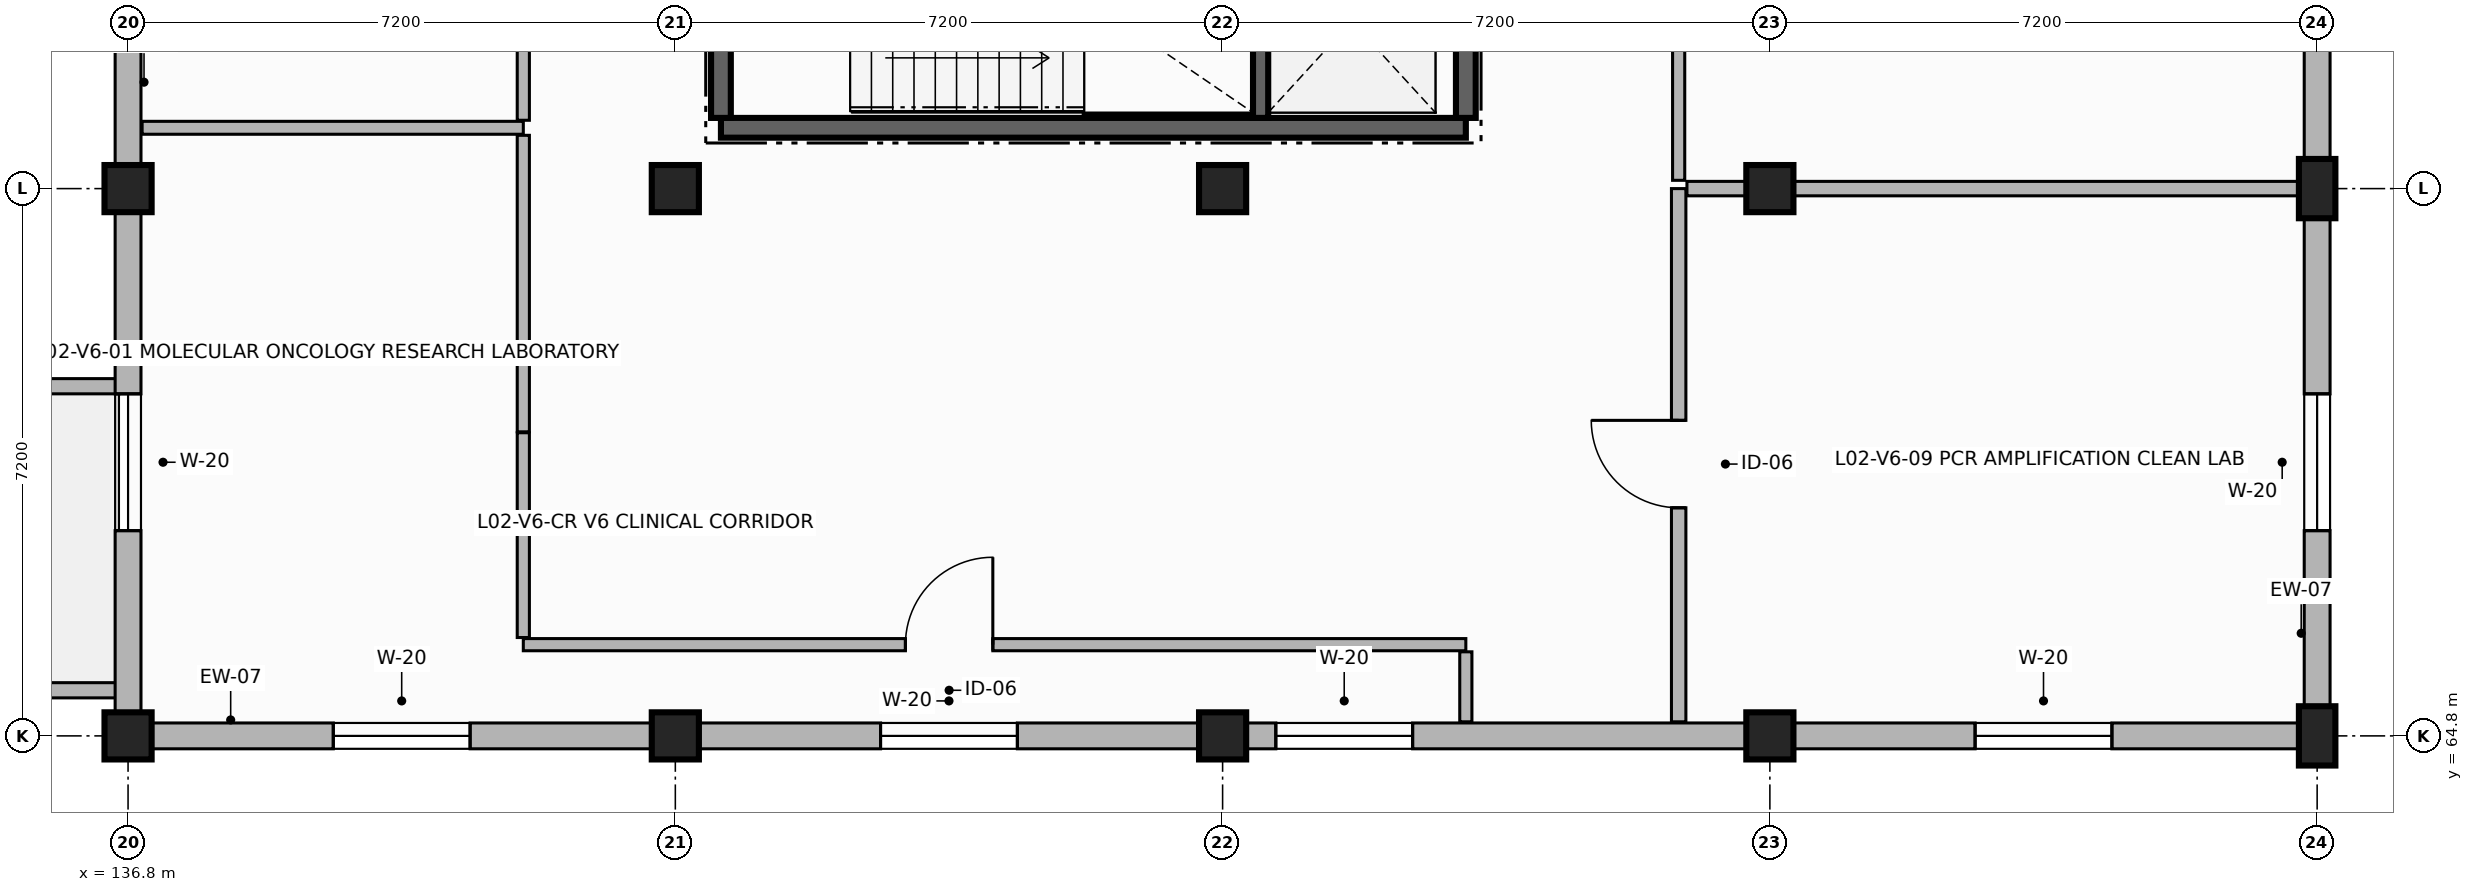
"""IFC4 building model, lengths in metres.
Left out: names, types, materials, properties, quantities, classifications, styles, units other than length and angle.
Written with IfcOpenShell. Run it as: python <this file> out.ifc"""

import sys

from ifc_helpers import new_model, si_unit, direction, frame, frame_2d, origin, origin_2d, place, context, subcontext, project, spatial, rectangle, extrude, element, fill, save


model = new_model("IFC4")
c1 = context("Model", 3, precision=1e-05, world=origin(), true_north=direction((0.0, 1.0)))
c2 = subcontext(c1, "Body", "Model", "MODEL_VIEW")
j1 = project(units=[si_unit("LENGTHUNIT", "METRE"), si_unit("PLANEANGLEUNIT", "RADIAN")], contexts=[c1])
p1 = place(None, origin())
s1 = spatial("IfcSite", under=j1, at=p1, CompositionType="ELEMENT")
p2 = place(p1, origin())
s2 = spatial("IfcBuilding", under=s1, at=p2, CompositionType="ELEMENT")
p3 = place(p2, frame((0.0, 0.0, 8.4)))
s3 = spatial("IfcBuildingStorey", under=s2, at=p3, CompositionType="ELEMENT", Elevation=8.4)
for number, where, z_axis, x_axis in (
    (1, (136.8, 64.8, 0.0), (0.0, 0.0, 1.0), (1.0, 0.0, 0.0)),
    (2, (136.8, 72.0, 0.0), (0.0, 0.0, 1.0), (1.0, 0.0, 0.0)),
    (3, (144.0, 64.8, 0.0), (0.0, 0.0, 1.0), (1.0, 0.0, 0.0)),
    (4, (144.0, 72.0, 0.0), (0.0, 0.0, 1.0), (1.0, 0.0, 0.0)),
    (5, (151.2, 64.8, 0.0), (0.0, 0.0, 1.0), (1.0, 0.0, 0.0)),
    (6, (151.2, 72.0, 0.0), (0.0, 0.0, 1.0), (1.0, 0.0, 0.0)),
    (7, (158.4, 64.8, 0.0), (0.0, 0.0, 1.0), (1.0, 0.0, 0.0)),
    (8, (158.4, 72.0, 0.0), (0.0, 0.0, 1.0), (1.0, 0.0, 0.0)),
):
    element("IfcColumn", number, at=place(p3, frame(where, z_axis=z_axis, x_axis=x_axis)), inside=s3, PredefinedType="COLUMN", context=c2, shape_type="SweptSolid", body=[
        extrude(rectangle(XDim=0.62, YDim=0.62, at=origin_2d()), origin(), (0.0, 0.0, 1.0), 3.58),
    ])
for number, where, z_axis, x_axis in (
    (9, (165.6, 64.8, 0.0), (0.0, 0.0, 1.0), (1.0, 0.0, 0.0)),
    (10, (165.6, 72.0, 0.0), (0.0, 0.0, 1.0), (1.0, 0.0, 0.0)),
):
    element("IfcColumn", number, at=place(p3, frame(where, z_axis=z_axis, x_axis=x_axis)), inside=s3, PredefinedType="PILASTER", context=c2, shape_type="SweptSolid", body=[
        extrude(rectangle(XDim=0.48, YDim=0.78, at=origin_2d()), origin(), (0.0, 0.0, 1.0), 3.58),
    ])
for number, where, z_axis, x_axis in (
    (11, (128.4, 65.4, 0.0), (0.0, 0.0, 1.0), (1.0, 0.0, 0.0)),
    (12, (136.68, 69.4, 0.0), (0.0, 0.0, 1.0), (-1.0, 0.0, 0.0)),
):
    element("IfcWall", number, at=place(p3, frame(where, z_axis=z_axis, x_axis=x_axis)), inside=s3, PredefinedType="PARAPET", context=c2, shape_type="SweptSolid", body=[
        extrude(rectangle(XDim=8.28, YDim=0.2, at=frame_2d((4.14, 0.0))), origin(), (0.0, 0.0, 1.0), 0.95),
    ])
p4 = place(p3, frame((136.8, 64.8, 0.0), z_axis=(0.0, 0.0, 1.0), x_axis=(1.0, 0.0, 0.0)))
e13 = element("IfcWall", 13, at=p4, inside=s3, PredefinedType="SOLIDWALL", context=c2, shape_type="SweptSolid", body=[
    extrude(rectangle(XDim=7.2, YDim=0.34, at=frame_2d((3.6, 0.0))), origin(), (0.0, 0.0, 1.0), 2.91),
])
p5 = place(p4, frame((2.7, 0.0, 0.85)))
e14 = element("IfcOpeningElement", 14, at=p5, cuts=e13, PredefinedType="OPENING", context=c2, shape_type="SweptSolid", body=[
    extrude(rectangle(XDim=1.8, YDim=1.85, at=frame_2d((0.9, 0.925))), frame((0.0, 0.18, 0.0), z_axis=(0.0, -1.0, 0.0), x_axis=(1.0, 0.0, 0.0)), (0.0, 0.0, 1.0), 0.36),
])
p6 = place(p3, frame((144.0, 64.8, 0.0), z_axis=(0.0, 0.0, 1.0), x_axis=(1.0, 0.0, 0.0)))
e15 = element("IfcWall", 15, at=p6, inside=s3, PredefinedType="SOLIDWALL", context=c2, shape_type="SweptSolid", body=[
    extrude(rectangle(XDim=7.2, YDim=0.34, at=frame_2d((3.6, 0.0))), origin(), (0.0, 0.0, 1.0), 2.91),
])
p7 = place(p6, frame((2.7, 0.0, 0.85)))
e16 = element("IfcOpeningElement", 16, at=p7, cuts=e15, PredefinedType="OPENING", context=c2, shape_type="SweptSolid", body=[
    extrude(rectangle(XDim=1.8, YDim=1.85, at=frame_2d((0.9, 0.925))), frame((0.0, 0.18, 0.0), z_axis=(0.0, -1.0, 0.0), x_axis=(1.0, 0.0, 0.0)), (0.0, 0.0, 1.0), 0.36),
])
p8 = place(p3, frame((151.2, 64.8, 0.0), z_axis=(0.0, 0.0, 1.0), x_axis=(1.0, 0.0, 0.0)))
e17 = element("IfcWall", 17, at=p8, inside=s3, PredefinedType="SOLIDWALL", context=c2, shape_type="SweptSolid", body=[
    extrude(rectangle(XDim=7.2, YDim=0.34, at=frame_2d((3.6, 0.0))), origin(), (0.0, 0.0, 1.0), 2.91),
])
p9 = place(p8, frame((0.7, 0.0, 0.85)))
e18 = element("IfcOpeningElement", 18, at=p9, cuts=e17, PredefinedType="OPENING", context=c2, shape_type="SweptSolid", body=[
    extrude(rectangle(XDim=1.8, YDim=1.85, at=frame_2d((0.9, 0.925))), frame((0.0, 0.18, 0.0), z_axis=(0.0, -1.0, 0.0), x_axis=(1.0, 0.0, 0.0)), (0.0, 0.0, 1.0), 0.36),
])
p10 = place(p3, frame((158.4, 64.8, 0.0), z_axis=(0.0, 0.0, 1.0), x_axis=(1.0, 0.0, 0.0)))
e19 = element("IfcWall", 19, at=p10, inside=s3, PredefinedType="SOLIDWALL", context=c2, shape_type="SweptSolid", body=[
    extrude(rectangle(XDim=7.2, YDim=0.34, at=frame_2d((3.6, 0.0))), origin(), (0.0, 0.0, 1.0), 2.91),
])
p11 = place(p10, frame((2.7, 0.0, 0.85)))
e20 = element("IfcOpeningElement", 20, at=p11, cuts=e19, PredefinedType="OPENING", context=c2, shape_type="SweptSolid", body=[
    extrude(rectangle(XDim=1.8, YDim=1.85, at=frame_2d((0.9, 0.925))), frame((0.0, 0.18, 0.0), z_axis=(0.0, -1.0, 0.0), x_axis=(1.0, 0.0, 0.0)), (0.0, 0.0, 1.0), 0.36),
])
p12 = place(p3, frame((165.6, 64.8, 0.0), z_axis=(0.0, 0.0, 1.0), x_axis=(0.0, 1.0, 0.0)))
e21 = element("IfcWall", 21, at=p12, inside=s3, PredefinedType="SOLIDWALL", context=c2, shape_type="SweptSolid", body=[
    extrude(rectangle(XDim=7.2, YDim=0.34, at=frame_2d((3.6, 0.0))), origin(), (0.0, 0.0, 1.0), 2.91),
])
p13 = place(p12, frame((2.7, 0.0, 0.85)))
e22 = element("IfcOpeningElement", 22, at=p13, cuts=e21, PredefinedType="OPENING", context=c2, shape_type="SweptSolid", body=[
    extrude(rectangle(XDim=1.8, YDim=1.85, at=frame_2d((0.9, 0.925))), frame((0.0, 0.18, 0.0), z_axis=(0.0, -1.0, 0.0), x_axis=(1.0, 0.0, 0.0)), (0.0, 0.0, 1.0), 0.36),
])
p14 = place(p3, frame((165.6, 72.0, 0.0), z_axis=(0.0, 0.0, 1.0), x_axis=(0.0, 1.0, 0.0)))
e23 = element("IfcWall", 23, at=p14, inside=s3, PredefinedType="SOLIDWALL", context=c2, shape_type="SweptSolid", body=[
    extrude(rectangle(XDim=7.2, YDim=0.34, at=frame_2d((3.6, 0.0))), origin(), (0.0, 0.0, 1.0), 2.91),
])
p15 = place(p14, frame((2.7, 0.0, 0.85)))
e24 = element("IfcOpeningElement", 24, at=p15, cuts=e23, PredefinedType="OPENING", context=c2, shape_type="SweptSolid", body=[
    extrude(rectangle(XDim=1.8, YDim=1.85, at=frame_2d((0.9, 0.925))), frame((0.0, 0.18, 0.0), z_axis=(0.0, -1.0, 0.0), x_axis=(1.0, 0.0, 0.0)), (0.0, 0.0, 1.0), 0.36),
])
p16 = place(p3, frame((136.8, 79.2, 0.0), z_axis=(0.0, 0.0, 1.0), x_axis=(0.0, -1.0, 0.0)))
e25 = element("IfcWall", 25, at=p16, inside=s3, PredefinedType="SOLIDWALL", context=c2, shape_type="SweptSolid", body=[
    extrude(rectangle(XDim=7.2, YDim=0.34, at=frame_2d((3.6, 0.0))), origin(), (0.0, 0.0, 1.0), 2.91),
])
p17 = place(p16, frame((2.6, 0.0, 0.85)))
e26 = element("IfcOpeningElement", 26, at=p17, cuts=e25, PredefinedType="OPENING", context=c2, shape_type="SweptSolid", body=[
    extrude(rectangle(XDim=1.8, YDim=1.85, at=frame_2d((0.9, 0.925))), frame((0.0, 0.18, 0.0), z_axis=(0.0, -1.0, 0.0), x_axis=(1.0, 0.0, 0.0)), (0.0, 0.0, 1.0), 0.36),
])
p18 = place(p3, frame((136.8, 72.0, 0.0), z_axis=(0.0, 0.0, 1.0), x_axis=(0.0, -1.0, 0.0)))
e27 = element("IfcWall", 27, at=p18, inside=s3, PredefinedType="SOLIDWALL", context=c2, shape_type="SweptSolid", body=[
    extrude(rectangle(XDim=7.2, YDim=0.34, at=frame_2d((3.6, 0.0))), origin(), (0.0, 0.0, 1.0), 2.91),
])
p19 = place(p18, frame((2.7, 0.0, 0.85)))
e28 = element("IfcOpeningElement", 28, at=p19, cuts=e27, PredefinedType="OPENING", context=c2, shape_type="SweptSolid", body=[
    extrude(rectangle(XDim=1.8, YDim=1.85, at=frame_2d((0.9, 0.925))), frame((0.0, 0.18, 0.0), z_axis=(0.0, -1.0, 0.0), x_axis=(1.0, 0.0, 0.0)), (0.0, 0.0, 1.0), 0.36),
])
p20 = place(p3, frame((144.6, 72.8, 0.0), z_axis=(0.0, 0.0, 1.0), x_axis=(1.0, 0.0, 0.0)))
e29 = element("IfcWall", 29, at=p20, inside=s3, PredefinedType="SHEAR", context=c2, shape_type="SweptSolid", body=[
    extrude(rectangle(XDim=9.8, YDim=0.26, at=frame_2d((4.9, 0.0))), origin(), (0.0, 0.0, 1.0), 3.58),
])
p21 = place(p3, frame((154.4, 72.93, 0.0), z_axis=(0.0, 0.0, 1.0), x_axis=(0.0, 1.0, 0.0)))
e30 = element("IfcWall", 30, at=p21, inside=s3, PredefinedType="SHEAR", context=c2, shape_type="SweptSolid", body=[
    extrude(rectangle(XDim=5.54, YDim=0.26, at=frame_2d((2.77, 0.0))), origin(), (0.0, 0.0, 1.0), 3.58),
])
p22 = place(p21, frame((4.07, 0.0, 0.0)))
e31 = element("IfcOpeningElement", 31, at=p22, cuts=e30, PredefinedType="OPENING", context=c2, shape_type="SweptSolid", body=[
    extrude(rectangle(XDim=1.15, YDim=2.2, at=frame_2d((0.575, 1.1))), frame((0.0, 0.14, 0.0), z_axis=(0.0, -1.0, 0.0), x_axis=(1.0, 0.0, 0.0)), (0.0, 0.0, 1.0), 0.28),
])
p23 = place(p3, frame((144.6, 78.47, 0.0), z_axis=(0.0, 0.0, 1.0), x_axis=(0.0, -1.0, 0.0)))
e32 = element("IfcWall", 32, at=p23, inside=s3, PredefinedType="SHEAR", context=c2, shape_type="SweptSolid", body=[
    extrude(rectangle(XDim=5.54, YDim=0.26, at=frame_2d((2.77, 0.0))), origin(), (0.0, 0.0, 1.0), 3.58),
])
p24 = place(p3, frame((151.7, 72.93, 0.0), z_axis=(0.0, 0.0, 1.0), x_axis=(0.0, 1.0, 0.0)))
e33 = element("IfcWall", 33, at=p24, inside=s3, PredefinedType="SHEAR", context=c2, shape_type="SweptSolid", body=[
    extrude(rectangle(XDim=3.67, YDim=0.2, at=frame_2d((1.835, 0.0))), origin(), (0.0, 0.0, 1.0), 3.58),
])
p25 = place(p3, frame((142.0, 66.0, 0.0), z_axis=(0.0, 0.0, 1.0), x_axis=(1.0, 0.0, 0.0)))
e34 = element("IfcWall", 34, at=p25, inside=s3, PredefinedType="PARTITIONING", context=c2, shape_type="SweptSolid", body=[
    extrude(rectangle(XDim=12.4, YDim=0.16, at=frame_2d((6.2, 0.0))), origin(), (0.0, 0.0, 1.0), 2.89),
])
p26 = place(p25, frame((5.027, 0.0, 0.0)))
e35 = element("IfcOpeningElement", 35, at=p26, cuts=e34, PredefinedType="OPENING", context=c2, shape_type="SweptSolid", body=[
    extrude(rectangle(XDim=1.15, YDim=2.25, at=frame_2d((0.575, 1.125))), frame((0.0, 0.09, 0.0), z_axis=(0.0, -1.0, 0.0), x_axis=(1.0, 0.0, 0.0)), (0.0, 0.0, 1.0), 0.18),
])
p27 = place(p3, frame((154.4, 65.906, 0.0), z_axis=(0.0, 0.0, 1.0), x_axis=(0.0, -1.0, 0.0)))
e36 = element("IfcWall", 36, at=p27, inside=s3, PredefinedType="PARTITIONING", context=c2, shape_type="SweptSolid", body=[
    extrude(rectangle(XDim=0.921, YDim=0.16, at=frame_2d((0.46, 0.0))), origin(), (0.0, 0.0, 1.0), 2.89),
])
p28 = place(p3, frame((136.985, 72.8, 0.0), z_axis=(0.0, 0.0, 1.0), x_axis=(1.0, 0.0, 0.0)))
e37 = element("IfcWall", 37, at=p28, inside=s3, PredefinedType="PARTITIONING", context=c2, shape_type="SweptSolid", body=[
    extrude(rectangle(XDim=5.015, YDim=0.17, at=frame_2d((2.507, 0.0))), origin(), (0.0, 0.0, 1.0), 2.89),
])
p29 = place(p3, frame((142.0, 72.701, 0.0), z_axis=(0.0, 0.0, 1.0), x_axis=(0.0, -1.0, 0.0)))
e38 = element("IfcWall", 38, at=p29, inside=s3, PredefinedType="PARTITIONING", context=c2, shape_type="SweptSolid", body=[
    extrude(rectangle(XDim=3.901, YDim=0.16, at=frame_2d((1.95, 0.0))), origin(), (0.0, 0.0, 1.0), 2.89),
])
p30 = place(p3, frame((142.0, 68.788, 0.0), z_axis=(0.0, 0.0, 1.0), x_axis=(0.0, -1.0, 0.0)))
e39 = element("IfcWall", 39, at=p30, inside=s3, PredefinedType="PARTITIONING", context=c2, shape_type="SweptSolid", body=[
    extrude(rectangle(XDim=2.694, YDim=0.16, at=frame_2d((1.347, 0.0))), origin(), (0.0, 0.0, 1.0), 2.89),
])
p31 = place(p3, frame((142.0, 78.501, 0.0), z_axis=(0.0, 0.0, 1.0), x_axis=(0.0, -1.0, 0.0)))
e40 = element("IfcWall", 40, at=p31, inside=s3, PredefinedType="PARTITIONING", context=c2, shape_type="SweptSolid", body=[
    extrude(rectangle(XDim=5.602, YDim=0.16, at=frame_2d((2.801, 0.0))), origin(), (0.0, 0.0, 1.0), 2.89),
])
p32 = place(p31, frame((2.342, 0.0, 0.0)))
e41 = element("IfcOpeningElement", 41, at=p32, cuts=e40, PredefinedType="OPENING", context=c2, shape_type="SweptSolid", body=[
    extrude(rectangle(XDim=1.15, YDim=2.25, at=frame_2d((0.575, 1.125))), frame((0.0, 0.09, 0.0), z_axis=(0.0, -1.0, 0.0), x_axis=(1.0, 0.0, 0.0)), (0.0, 0.0, 1.0), 0.18),
])
p33 = place(p3, frame((157.2, 64.985, 0.0), z_axis=(0.0, 0.0, 1.0), x_axis=(0.0, 1.0, 0.0)))
e42 = element("IfcWall", 42, at=p33, inside=s3, PredefinedType="PARTITIONING", context=c2, shape_type="SweptSolid", body=[
    extrude(rectangle(XDim=7.015, YDim=0.19, at=frame_2d((3.507, 0.0))), origin(), (0.0, 0.0, 1.0), 2.89),
])
p34 = place(p33, frame((2.816, 0.0, 0.0)))
e43 = element("IfcOpeningElement", 43, at=p34, cuts=e42, PredefinedType="OPENING", context=c2, shape_type="SweptSolid", body=[
    extrude(rectangle(XDim=1.15, YDim=2.25, at=frame_2d((0.575, 1.125))), frame((0.0, 0.105, 0.0), z_axis=(0.0, -1.0, 0.0), x_axis=(1.0, 0.0, 0.0)), (0.0, 0.0, 1.0), 0.21),
])
p35 = place(p3, frame((157.309, 72.0, 0.0), z_axis=(0.0, 0.0, 1.0), x_axis=(1.0, 0.0, 0.0)))
e44 = element("IfcWall", 44, at=p35, inside=s3, PredefinedType="PARTITIONING", context=c2, shape_type="SweptSolid", body=[
    extrude(rectangle(XDim=8.106, YDim=0.19, at=frame_2d((4.053, 0.0))), origin(), (0.0, 0.0, 1.0), 2.89),
])
p36 = place(p3, frame((157.2, 72.109, 0.0), z_axis=(0.0, 0.0, 1.0), x_axis=(0.0, 1.0, 0.0)))
e45 = element("IfcWall", 45, at=p36, inside=s3, PredefinedType="PARTITIONING", context=c2, shape_type="SweptSolid", body=[
    extrude(rectangle(XDim=7.091, YDim=0.16, at=frame_2d((3.545, 0.0))), origin(), (0.0, 0.0, 1.0), 2.89),
])
p37 = place(p36, frame((3.036, 0.0, 0.0)))
e46 = element("IfcOpeningElement", 46, at=p37, cuts=e45, PredefinedType="OPENING", context=c2, shape_type="SweptSolid", body=[
    extrude(rectangle(XDim=1.02, YDim=2.15, at=frame_2d((0.51, 1.075))), frame((0.0, 0.09, 0.0), z_axis=(0.0, -1.0, 0.0), x_axis=(1.0, 0.0, 0.0)), (0.0, 0.0, 1.0), 0.18),
])
p38 = place(p5, origin())
e47 = element("IfcWindow", 47, at=p38, inside=s3, PartitioningType="SINGLE_PANEL", PredefinedType="WINDOW", context=c2, shape_type="SweptSolid", body=[
    extrude(rectangle(XDim=1.8, YDim=1.85, at=frame_2d((0.9, 0.925))), frame((0.0, 0.03, 0.0), z_axis=(0.0, -1.0, 0.0), x_axis=(1.0, 0.0, 0.0)), (0.0, 0.0, 1.0), 0.06),
])
fill(e14, e47)
p39 = place(p7, origin())
e48 = element("IfcWindow", 48, at=p39, inside=s3, PartitioningType="SINGLE_PANEL", PredefinedType="WINDOW", context=c2, shape_type="SweptSolid", body=[
    extrude(rectangle(XDim=1.8, YDim=1.85, at=frame_2d((0.9, 0.925))), frame((0.0, 0.03, 0.0), z_axis=(0.0, -1.0, 0.0), x_axis=(1.0, 0.0, 0.0)), (0.0, 0.0, 1.0), 0.06),
])
fill(e16, e48)
p40 = place(p9, origin())
e49 = element("IfcWindow", 49, at=p40, inside=s3, PartitioningType="SINGLE_PANEL", PredefinedType="WINDOW", context=c2, shape_type="SweptSolid", body=[
    extrude(rectangle(XDim=1.8, YDim=1.85, at=frame_2d((0.9, 0.925))), frame((0.0, 0.03, 0.0), z_axis=(0.0, -1.0, 0.0), x_axis=(1.0, 0.0, 0.0)), (0.0, 0.0, 1.0), 0.06),
])
fill(e18, e49)
p41 = place(p11, origin())
e50 = element("IfcWindow", 50, at=p41, inside=s3, PartitioningType="SINGLE_PANEL", PredefinedType="WINDOW", context=c2, shape_type="SweptSolid", body=[
    extrude(rectangle(XDim=1.8, YDim=1.85, at=frame_2d((0.9, 0.925))), frame((0.0, 0.03, 0.0), z_axis=(0.0, -1.0, 0.0), x_axis=(1.0, 0.0, 0.0)), (0.0, 0.0, 1.0), 0.06),
])
fill(e20, e50)
p42 = place(p13, origin())
e51 = element("IfcWindow", 51, at=p42, inside=s3, PartitioningType="SINGLE_PANEL", PredefinedType="WINDOW", context=c2, shape_type="SweptSolid", body=[
    extrude(rectangle(XDim=1.8, YDim=1.85, at=frame_2d((0.9, 0.925))), frame((0.0, 0.03, 0.0), z_axis=(0.0, -1.0, 0.0), x_axis=(1.0, 0.0, 0.0)), (0.0, 0.0, 1.0), 0.06),
])
fill(e22, e51)
p43 = place(p19, origin())
e52 = element("IfcWindow", 52, at=p43, inside=s3, PartitioningType="SINGLE_PANEL", PredefinedType="WINDOW", context=c2, shape_type="SweptSolid", body=[
    extrude(rectangle(XDim=1.8, YDim=1.85, at=frame_2d((0.9, 0.925))), frame((0.0, 0.03, 0.0), z_axis=(0.0, -1.0, 0.0), x_axis=(1.0, 0.0, 0.0)), (0.0, 0.0, 1.0), 0.06),
])
fill(e28, e52)
p44 = place(p26, origin())
e53 = element("IfcDoor", 53, at=p44, inside=s3, OperationType="SINGLE_SWING_RIGHT", PredefinedType="DOOR", context=c2, shape_type="SweptSolid", body=[
    extrude(rectangle(XDim=1.15, YDim=2.25, at=frame_2d((0.575, 1.125))), frame((0.0, 0.025, 0.0), z_axis=(0.0, -1.0, 0.0), x_axis=(1.0, 0.0, 0.0)), (0.0, 0.0, 1.0), 0.05),
])
fill(e35, e53)
p45 = place(p34, origin())
e54 = element("IfcDoor", 54, at=p45, inside=s3, OperationType="SINGLE_SWING_RIGHT", PredefinedType="DOOR", context=c2, shape_type="SweptSolid", body=[
    extrude(rectangle(XDim=1.15, YDim=2.25, at=frame_2d((0.575, 1.125))), frame((0.0, 0.025, 0.0), z_axis=(0.0, -1.0, 0.0), x_axis=(1.0, 0.0, 0.0)), (0.0, 0.0, 1.0), 0.05),
])
fill(e43, e54)
save(model, sys.argv[1])
